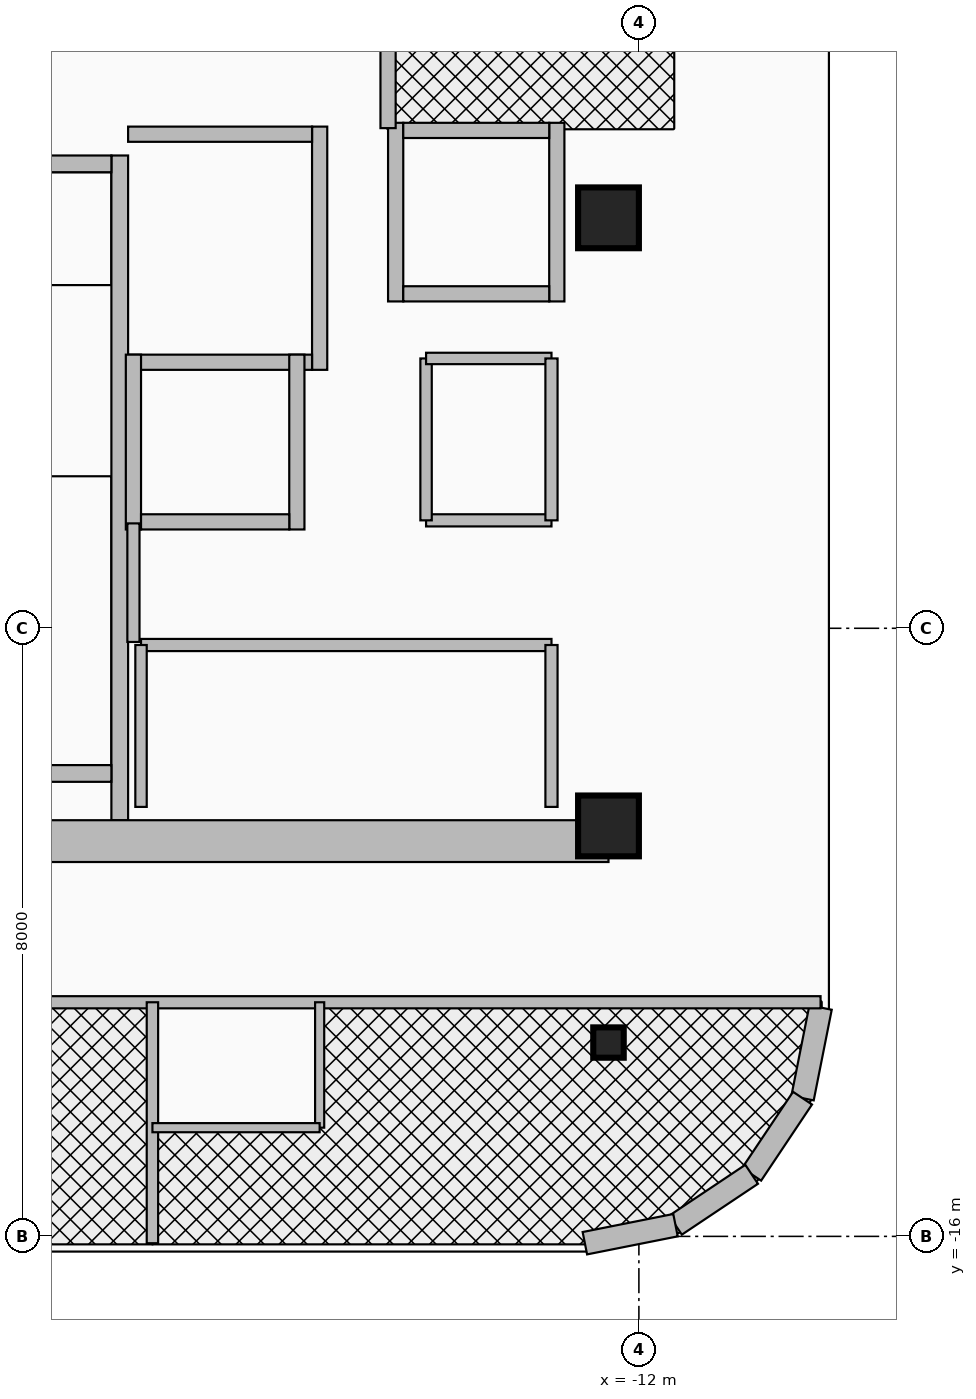
"""IFC4 building model, lengths in metres.
Left out: names, types, materials, properties, quantities, classifications, styles, units other than length and angle.
Written with IfcOpenShell. Run it as: python <this file> out.ifc"""

import sys

from ifc_helpers import new_model, si_unit, direction, frame, frame_2d, origin, origin_2d, place, context, subcontext, project, spatial, rectangle, i_section, extrude, source, transform, mapped, element, fill, save


model = new_model("IFC4")
c1 = context("Model", 3, precision=1e-05, world=origin(), true_north=direction((0.0, 1.0)))
c2 = subcontext(c1, "Body", "Model", "MODEL_VIEW")
j1 = project(units=[si_unit("LENGTHUNIT", "METRE"), si_unit("PLANEANGLEUNIT", "RADIAN")], contexts=[c1])
p1 = place(None, origin())
s1 = spatial("IfcSite", under=j1, at=p1, CompositionType="ELEMENT")
p2 = place(p1, origin())
s2 = spatial("IfcBuilding", under=s1, at=p2, CompositionType="ELEMENT")
p3 = place(p2, frame((0.0, 0.0, 240.5)))
s3 = spatial("IfcBuildingStorey", under=s2, at=p3, CompositionType="ELEMENT", Elevation=240.5)
p4 = place(p3, frame((-18.83, -10.525, 0.0), z_axis=(0.0, 0.0, 1.0), x_axis=(0.0, 1.0, 0.0)))
e1 = element("IfcWall", 1, at=p4, inside=s3, PredefinedType="SHEAR", context=c2, shape_type="SweptSolid", body=[
    extrude(rectangle(XDim=8.745, YDim=0.22, at=frame_2d((4.373, 0.0))), origin(), (0.0, 0.0, 1.0), 3.26),
])
p5 = place(p3, frame((-22.05, -9.91, 0.0), z_axis=(0.0, 0.0, 1.0), x_axis=(1.0, 0.0, 0.0)))
e2 = element("IfcWall", 2, at=p5, inside=s3, PredefinedType="SHEAR", context=c2, shape_type="SweptSolid", body=[
    extrude(rectangle(XDim=3.11, YDim=0.22, at=frame_2d((1.555, 0.0))), origin(), (0.0, 0.0, 1.0), 3.26),
])
p6 = place(p3, frame((-22.05, -1.89, 0.0), z_axis=(0.0, 0.0, 1.0), x_axis=(1.0, 0.0, 0.0)))
e3 = element("IfcWall", 3, at=p6, inside=s3, PredefinedType="SHEAR", context=c2, shape_type="SweptSolid", body=[
    extrude(rectangle(XDim=3.11, YDim=0.22, at=frame_2d((1.555, 0.0))), origin(), (0.0, 0.0, 1.0), 3.26),
])
p7 = place(p6, frame((1.0, 0.0, 0.0)))
e4 = element("IfcOpeningElement", 4, at=p7, cuts=e3, PredefinedType="OPENING", context=c2, shape_type="SweptSolid", body=[
    extrude(rectangle(XDim=1.1, YDim=2.15, at=frame_2d((0.55, 1.075))), frame((0.0, 0.125, 0.0), z_axis=(0.0, -1.0, 0.0), x_axis=(1.0, 0.0, 0.0)), (0.0, 0.0, 1.0), 0.25),
])
p8 = place(p3, frame((-22.65, -10.8, 0.0), z_axis=(0.0, 0.0, 1.0), x_axis=(1.0, 0.0, 0.0)))
e5 = element("IfcWall", 5, at=p8, inside=s3, PredefinedType="SHEAR", context=c2, shape_type="SweptSolid", body=[
    extrude(rectangle(XDim=10.25, YDim=0.55, at=frame_2d((5.125, 0.0))), origin(), (0.0, 0.0, 1.0), 3.26),
])
m1 = source(origin(), c2, "Body", "SweptSolid", [
    extrude(rectangle(XDim=0.8, YDim=0.8, at=origin_2d()), origin(), (0.0, 0.0, 1.0), 3.5),
])
for number, where, z_axis, x_axis in (
    (6, (-12.4, -10.6, 0.0), (0.0, 0.0, 1.0), (1.0, 0.0, 0.0)),
    (7, (-12.4, -2.6, 0.0), (0.0, 0.0, 1.0), (1.0, 0.0, 0.0)),
):
    element("IfcColumn", number, at=place(p3, frame(where, z_axis=z_axis, x_axis=x_axis)), inside=s3, PredefinedType="COLUMN", context=c2, shape_type="MappedRepresentation", body=[
        mapped(m1, transform((0.0, 0.0, 0.0), x_axis=(1.0, 0.0, 0.0), y_axis=(0.0, 1.0, 0.0), z_axis=(0.0, 0.0, 1.0), scale=1.0)),
    ])
m2 = source(origin(), c2, "Body", "SweptSolid", [
    extrude(i_section(OverallWidth=0.401, OverallDepth=0.399, WebThickness=0.025, FlangeThickness=0.04, at=origin_2d()), origin(), (0.0, 0.0, 1.0), 3.5),
])
p9 = place(p3, frame((-12.4, -13.45, 0.0), z_axis=(0.0, 0.0, 1.0), x_axis=(1.0, 0.0, 0.0)))
e8 = element("IfcColumn", 8, at=p9, inside=s3, PredefinedType="COLUMN", context=c2, shape_type="MappedRepresentation", body=[
    mapped(m2, transform((0.0, 0.0, 0.0), x_axis=(1.0, 0.0, 0.0), y_axis=(0.0, 1.0, 0.0), z_axis=(0.0, 0.0, 1.0), scale=1.0)),
])
p10 = place(p3, frame((-9.61, -12.989, 0.0), z_axis=(0.0, 0.0, 1.0), x_axis=(-0.194996050505, -0.980804027463, 0.0)))
e9 = element("IfcWall", 9, at=p10, inside=s3, PredefinedType="SOLIDWALL", context=c2, shape_type="SweptSolid", body=[
    extrude(rectangle(XDim=1.216, YDim=0.3, at=frame_2d((0.608, 0.0))), origin(), (0.0, 0.0, 1.0), 3.26),
])
for number, where, z_axis, x_axis in (
    (10, (-9.847, -14.182, 0.0), (0.0, 0.0, 1.0), (-0.556, -0.831, 0.0)),
    (11, (-10.517, -15.183, 0.0), (0.0, 0.0, 1.0), (-0.831, -0.556, 0.0)),
):
    element("IfcWall", number, at=place(p3, frame(where, z_axis=z_axis, x_axis=x_axis)), inside=s3, PredefinedType="SOLIDWALL", context=c2, shape_type="SweptSolid", body=[
        extrude(rectangle(XDim=1.205, YDim=0.3, at=frame_2d((0.603, 0.0))), origin(), (0.0, 0.0, 1.0), 3.26),
    ])
p11 = place(p3, frame((-11.518, -15.853, 0.0), z_axis=(0.0, 0.0, 1.0), x_axis=(-0.980765602568, -0.195189223115, 0.0)))
e12 = element("IfcWall", 12, at=p11, inside=s3, PredefinedType="SOLIDWALL", context=c2, shape_type="SweptSolid", body=[
    extrude(rectangle(XDim=1.216, YDim=0.3, at=frame_2d((0.608, 0.0))), origin(), (0.0, 0.0, 1.0), 3.26),
])
p12 = place(p3, frame((-16.2, -4.6, 0.0), z_axis=(0.0, 0.0, 1.0), x_axis=(0.0, 1.0, 0.0)))
e13 = element("IfcWall", 13, at=p12, inside=s3, PredefinedType="MOVABLE", context=c2, shape_type="SweptSolid", body=[
    extrude(rectangle(XDim=3.2, YDim=0.2, at=frame_2d((1.6, 0.0))), origin(), (0.0, 0.0, 1.0), 3.26),
])
p13 = place(p3, frame((-18.72, -4.5, 0.0), z_axis=(0.0, 0.0, 1.0), x_axis=(1.0, 0.0, 0.0)))
e14 = element("IfcWall", 14, at=p13, inside=s3, PredefinedType="MOVABLE", context=c2, shape_type="SweptSolid", body=[
    extrude(rectangle(XDim=2.42, YDim=0.2, at=frame_2d((1.21, 0.0))), origin(), (0.0, 0.0, 1.0), 3.26),
])
p14 = place(p3, frame((-18.72, -1.5, 0.0), z_axis=(0.0, 0.0, 1.0), x_axis=(1.0, 0.0, 0.0)))
e15 = element("IfcWall", 15, at=p14, inside=s3, PredefinedType="MOVABLE", context=c2, shape_type="SweptSolid", body=[
    extrude(rectangle(XDim=2.42, YDim=0.2, at=frame_2d((1.21, 0.0))), origin(), (0.0, 0.0, 1.0), 3.26),
])
p15 = place(p14, frame((0.61, 0.0, 0.0)))
e16 = element("IfcOpeningElement", 16, at=p15, cuts=e15, PredefinedType="OPENING", context=c2, shape_type="SweptSolid", body=[
    extrude(rectangle(XDim=1.2, YDim=2.1, at=frame_2d((0.6, 1.05))), frame((0.0, 0.115, 0.0), z_axis=(0.0, -1.0, 0.0), x_axis=(1.0, 0.0, 0.0)), (0.0, 0.0, 1.0), 0.23),
])
for number, where, z_axis, x_axis in (
    (17, (-18.65, -6.7, 0.0), (0.0, 0.0, 1.0), (0.0, 1.0, 0.0)),
    (18, (-16.5, -6.7, 0.0), (0.0, 0.0, 1.0), (0.0, 1.0, 0.0)),
):
    element("IfcWall", number, at=place(p3, frame(where, z_axis=z_axis, x_axis=x_axis)), inside=s3, PredefinedType="MOVABLE", context=c2, shape_type="SweptSolid", body=[
        extrude(rectangle(XDim=2.3, YDim=0.2, at=frame_2d((1.15, 0.0))), origin(), (0.0, 0.0, 1.0), 3.26),
    ])
p16 = place(p3, frame((-18.55, -6.6, 0.0), z_axis=(0.0, 0.0, 1.0), x_axis=(1.0, 0.0, 0.0)))
e19 = element("IfcWall", 19, at=p16, inside=s3, PredefinedType="MOVABLE", context=c2, shape_type="SweptSolid", body=[
    extrude(rectangle(XDim=1.95, YDim=0.2, at=frame_2d((0.975, 0.0))), origin(), (0.0, 0.0, 1.0), 3.26),
])
p17 = place(p16, frame((0.425, 0.0, 0.0)))
e20 = element("IfcOpeningElement", 20, at=p17, cuts=e19, PredefinedType="OPENING", context=c2, shape_type="SweptSolid", body=[
    extrude(rectangle(XDim=1.1, YDim=2.1, at=frame_2d((0.55, 1.05))), frame((0.0, 0.115, 0.0), z_axis=(0.0, -1.0, 0.0), x_axis=(1.0, 0.0, 0.0)), (0.0, 0.0, 1.0), 0.23),
])
for number, where, z_axis, x_axis in (
    (21, (-15.2, -3.7, 0.0), (0.0, 0.0, 1.0), (0.0, 1.0, 0.0)),
    (22, (-13.08, -3.7, 0.0), (0.0, 0.0, 1.0), (0.0, 1.0, 0.0)),
):
    element("IfcWall", number, at=place(p3, frame(where, z_axis=z_axis, x_axis=x_axis)), inside=s3, PredefinedType="MOVABLE", context=c2, shape_type="SweptSolid", body=[
        extrude(rectangle(XDim=2.35, YDim=0.2, at=frame_2d((1.175, 0.0))), origin(), (0.0, 0.0, 1.0), 3.26),
    ])
p18 = place(p3, frame((-15.1, -3.6, 0.0), z_axis=(0.0, 0.0, 1.0), x_axis=(1.0, 0.0, 0.0)))
e23 = element("IfcWall", 23, at=p18, inside=s3, PredefinedType="MOVABLE", context=c2, shape_type="SweptSolid", body=[
    extrude(rectangle(XDim=1.92, YDim=0.2, at=frame_2d((0.96, 0.0))), origin(), (0.0, 0.0, 1.0), 3.26),
])
p19 = place(p3, frame((-15.1, -1.45, 0.0), z_axis=(0.0, 0.0, 1.0), x_axis=(1.0, 0.0, 0.0)))
e24 = element("IfcWall", 24, at=p19, inside=s3, PredefinedType="MOVABLE", context=c2, shape_type="SweptSolid", body=[
    extrude(rectangle(XDim=1.92, YDim=0.2, at=frame_2d((0.96, 0.0))), origin(), (0.0, 0.0, 1.0), 3.26),
])
p20 = place(p19, frame((0.41, 0.0, 0.0)))
e25 = element("IfcOpeningElement", 25, at=p20, cuts=e24, PredefinedType="OPENING", context=c2, shape_type="SweptSolid", body=[
    extrude(rectangle(XDim=1.1, YDim=2.1, at=frame_2d((0.55, 1.05))), frame((0.0, 0.115, 0.0), z_axis=(0.0, -1.0, 0.0), x_axis=(1.0, 0.0, 0.0)), (0.0, 0.0, 1.0), 0.23),
])
p21 = place(p3, frame((-15.3, -1.42, 0.0), z_axis=(0.0, 0.0, 1.0), x_axis=(0.0, 1.0, 0.0)))
e26 = element("IfcWall", 26, at=p21, inside=s3, PredefinedType="PARTITIONING", context=c2, shape_type="SweptSolid", body=[
    extrude(rectangle(XDim=2.67, YDim=0.2, at=frame_2d((1.335, 0.0))), origin(), (0.0, 0.0, 1.0), 3.26),
])
p22 = place(p21, frame((0.78, 0.0, 0.0)))
e27 = element("IfcOpeningElement", 27, at=p22, cuts=e26, PredefinedType="OPENING", context=c2, shape_type="SweptSolid", body=[
    extrude(rectangle(XDim=1.05, YDim=2.15, at=frame_2d((0.525, 1.075))), frame((0.0, 0.115, 0.0), z_axis=(0.0, -1.0, 0.0), x_axis=(1.0, 0.0, 0.0)), (0.0, 0.0, 1.0), 0.23),
])
p23 = place(p3, frame((-18.65, -8.18, 0.0), z_axis=(0.0, 0.0, 1.0), x_axis=(0.0, 1.0, 0.0)))
e28 = element("IfcWall", 28, at=p23, inside=s3, PredefinedType="PARTITIONING", context=c2, shape_type="SweptSolid", body=[
    extrude(rectangle(XDim=1.56, YDim=0.16, at=frame_2d((0.78, 0.0))), origin(), (0.0, 0.0, 1.0), 3.26),
])
p24 = place(p3, frame((-18.55, -8.22, 0.0), z_axis=(0.0, 0.0, 1.0), x_axis=(1.0, 0.0, 0.0)))
e29 = element("IfcWall", 29, at=p24, inside=s3, PredefinedType="PARTITIONING", context=c2, shape_type="SweptSolid", body=[
    extrude(rectangle(XDim=5.4, YDim=0.16, at=frame_2d((2.7, 0.0))), origin(), (0.0, 0.0, 1.0), 3.26),
])
p25 = place(p24, frame((1.15, 0.0, 0.0)))
e30 = element("IfcOpeningElement", 30, at=p25, cuts=e29, PredefinedType="OPENING", context=c2, shape_type="SweptSolid", body=[
    extrude(rectangle(XDim=0.95, YDim=2.15, at=frame_2d((0.475, 1.075))), frame((0.0, 0.095, 0.0), z_axis=(0.0, -1.0, 0.0), x_axis=(1.0, 0.0, 0.0)), (0.0, 0.0, 1.0), 0.19),
])
p26 = place(p3, frame((-18.55, -10.35, 0.0), z_axis=(0.0, 0.0, 1.0), x_axis=(0.0, 1.0, 0.0)))
e31 = element("IfcWall", 31, at=p26, inside=s3, PredefinedType="PARTITIONING", context=c2, shape_type="SweptSolid", body=[
    extrude(rectangle(XDim=2.13, YDim=0.15, at=frame_2d((1.065, 0.0))), origin(), (0.0, 0.0, 1.0), 3.26),
])
p27 = place(p3, frame((-13.15, -10.35, 0.0), z_axis=(0.0, 0.0, 1.0), x_axis=(0.0, 1.0, 0.0)))
e32 = element("IfcWall", 32, at=p27, inside=s3, PredefinedType="PARTITIONING", context=c2, shape_type="SweptSolid", body=[
    extrude(rectangle(XDim=2.13, YDim=0.16, at=frame_2d((1.065, 0.0))), origin(), (0.0, 0.0, 1.0), 3.26),
])
p28 = place(p3, frame((-14.8, -6.58, 0.0), z_axis=(0.0, 0.0, 1.0), x_axis=(1.0, 0.0, 0.0)))
e33 = element("IfcWall", 33, at=p28, inside=s3, PredefinedType="PARTITIONING", context=c2, shape_type="SweptSolid", body=[
    extrude(rectangle(XDim=1.65, YDim=0.16, at=frame_2d((0.825, 0.0))), origin(), (0.0, 0.0, 1.0), 3.26),
])
p29 = place(p28, frame((0.5, 0.0, 0.0)))
e34 = element("IfcOpeningElement", 34, at=p29, cuts=e33, PredefinedType="OPENING", context=c2, shape_type="SweptSolid", body=[
    extrude(rectangle(XDim=0.85, YDim=2.05, at=frame_2d((0.425, 1.025))), frame((0.0, 0.095, 0.0), z_axis=(0.0, -1.0, 0.0), x_axis=(1.0, 0.0, 0.0)), (0.0, 0.0, 1.0), 0.19),
])
p30 = place(p3, frame((-14.8, -6.58, 0.0), z_axis=(0.0, 0.0, 1.0), x_axis=(0.0, 1.0, 0.0)))
e35 = element("IfcWall", 35, at=p30, inside=s3, PredefinedType="PARTITIONING", context=c2, shape_type="SweptSolid", body=[
    extrude(rectangle(XDim=2.13, YDim=0.15, at=frame_2d((1.065, 0.0))), origin(), (0.0, 0.0, 1.0), 3.26),
])
p31 = place(p3, frame((-14.8, -4.45, 0.0), z_axis=(0.0, 0.0, 1.0), x_axis=(1.0, 0.0, 0.0)))
e36 = element("IfcWall", 36, at=p31, inside=s3, PredefinedType="PARTITIONING", context=c2, shape_type="SweptSolid", body=[
    extrude(rectangle(XDim=1.65, YDim=0.15, at=frame_2d((0.825, 0.0))), origin(), (0.0, 0.0, 1.0), 3.26),
])
p32 = place(p3, frame((-13.15, -6.58, 0.0), z_axis=(0.0, 0.0, 1.0), x_axis=(0.0, 1.0, 0.0)))
e37 = element("IfcWall", 37, at=p32, inside=s3, PredefinedType="PARTITIONING", context=c2, shape_type="SweptSolid", body=[
    extrude(rectangle(XDim=2.13, YDim=0.16, at=frame_2d((1.065, 0.0))), origin(), (0.0, 0.0, 1.0), 3.26),
])
p33 = place(p3, frame((-30.39, -12.92, 0.0), z_axis=(0.0, 0.0, 1.0), x_axis=(1.0, 0.0, 0.0)))
e38 = element("IfcWall", 38, at=p33, inside=s3, PredefinedType="PARTITIONING", context=c2, shape_type="SweptSolid", body=[
    extrude(rectangle(XDim=20.78, YDim=0.16, at=frame_2d((10.39, 0.0))), origin(), (0.0, 0.0, 1.0), 2.634),
])
p34 = place(p33, frame((6.5, 0.0, 0.0)))
e39 = element("IfcOpeningElement", 39, at=p34, cuts=e38, PredefinedType="OPENING", context=c2, shape_type="SweptSolid", body=[
    extrude(rectangle(XDim=0.95, YDim=2.15, at=frame_2d((0.475, 1.075))), frame((0.0, 0.095, 0.0), z_axis=(0.0, -1.0, 0.0), x_axis=(1.0, 0.0, 0.0)), (0.0, 0.0, 1.0), 0.19),
])
p35 = place(p33, frame((16.73, 0.0, 0.0)))
e40 = element("IfcOpeningElement", 40, at=p35, cuts=e38, PredefinedType="OPENING", context=c2, shape_type="SweptSolid", body=[
    extrude(rectangle(XDim=0.95, YDim=2.15, at=frame_2d((0.475, 1.075))), frame((0.0, 0.095, 0.0), z_axis=(0.0, -1.0, 0.0), x_axis=(1.0, 0.0, 0.0)), (0.0, 0.0, 1.0), 0.19),
])
p36 = place(p3, frame((-18.4, -16.09, 0.0), z_axis=(0.0, 0.0, 1.0), x_axis=(0.0, 1.0, 0.0)))
e41 = element("IfcWall", 41, at=p36, inside=s3, PredefinedType="PARTITIONING", context=c2, shape_type="SweptSolid", body=[
    extrude(rectangle(XDim=3.17, YDim=0.15, at=frame_2d((1.585, 0.0))), origin(), (0.0, 0.0, 1.0), 2.706),
])
p37 = place(p3, frame((-16.2, -14.57, 0.0), z_axis=(0.0, 0.0, 1.0), x_axis=(0.0, 1.0, 0.0)))
e42 = element("IfcWall", 42, at=p37, inside=s3, PredefinedType="PARTITIONING", context=c2, shape_type="SweptSolid", body=[
    extrude(rectangle(XDim=1.65, YDim=0.12, at=frame_2d((0.825, 0.0))), origin(), (0.0, 0.0, 1.0), 2.706),
])
p38 = place(p3, frame((-18.4, -14.57, 0.0), z_axis=(0.0, 0.0, 1.0), x_axis=(1.0, 0.0, 0.0)))
e43 = element("IfcWall", 43, at=p38, inside=s3, PredefinedType="PARTITIONING", context=c2, shape_type="SweptSolid", body=[
    extrude(rectangle(XDim=2.2, YDim=0.12, at=frame_2d((1.1, 0.0))), origin(), (0.0, 0.0, 1.0), 3.26),
])
p39 = place(p38, frame((0.675, 0.0, 0.0)))
e44 = element("IfcOpeningElement", 44, at=p39, cuts=e43, PredefinedType="OPENING", context=c2, shape_type="SweptSolid", body=[
    extrude(rectangle(XDim=0.85, YDim=2.1, at=frame_2d((0.425, 1.05))), frame((0.0, 0.075, 0.0), z_axis=(0.0, -1.0, 0.0), x_axis=(1.0, 0.0, 0.0)), (0.0, 0.0, 1.0), 0.15),
])
p40 = place(p15, origin())
e45 = element("IfcDoor", 45, at=p40, inside=s3, OperationType="DOUBLE_DOOR_SLIDING", PredefinedType="DOOR", context=c2, shape_type="SweptSolid", body=[
    extrude(rectangle(XDim=1.2, YDim=2.1, at=frame_2d((0.6, 1.05))), frame((0.0, 0.025, 0.0), z_axis=(0.0, -1.0, 0.0), x_axis=(1.0, 0.0, 0.0)), (0.0, 0.0, 1.0), 0.05),
])
fill(e16, e45)
p41 = place(p17, origin())
e46 = element("IfcDoor", 46, at=p41, inside=s3, OperationType="DOUBLE_DOOR_SLIDING", PredefinedType="DOOR", context=c2, shape_type="SweptSolid", body=[
    extrude(rectangle(XDim=1.1, YDim=2.1, at=frame_2d((0.55, 1.05))), frame((0.0, 0.025, 0.0), z_axis=(0.0, -1.0, 0.0), x_axis=(1.0, 0.0, 0.0)), (0.0, 0.0, 1.0), 0.05),
])
fill(e20, e46)
p42 = place(p20, origin())
e47 = element("IfcDoor", 47, at=p42, inside=s3, OperationType="DOUBLE_DOOR_SLIDING", PredefinedType="DOOR", context=c2, shape_type="SweptSolid", body=[
    extrude(rectangle(XDim=1.1, YDim=2.1, at=frame_2d((0.55, 1.05))), frame((0.0, 0.025, 0.0), z_axis=(0.0, -1.0, 0.0), x_axis=(1.0, 0.0, 0.0)), (0.0, 0.0, 1.0), 0.05),
])
fill(e25, e47)
p43 = place(p22, origin())
e48 = element("IfcDoor", 48, at=p43, inside=s3, OperationType="SINGLE_SWING_RIGHT", PredefinedType="DOOR", context=c2, shape_type="SweptSolid", body=[
    extrude(rectangle(XDim=1.05, YDim=2.15, at=frame_2d((0.525, 1.075))), frame((0.0, 0.025, 0.0), z_axis=(0.0, -1.0, 0.0), x_axis=(1.0, 0.0, 0.0)), (0.0, 0.0, 1.0), 0.05),
])
fill(e27, e48)
p44 = place(p25, origin())
e49 = element("IfcDoor", 49, at=p44, inside=s3, OperationType="SINGLE_SWING_RIGHT", PredefinedType="DOOR", context=c2, shape_type="SweptSolid", body=[
    extrude(rectangle(XDim=0.95, YDim=2.15, at=frame_2d((0.475, 1.075))), frame((0.0, 0.025, 0.0), z_axis=(0.0, -1.0, 0.0), x_axis=(1.0, 0.0, 0.0)), (0.0, 0.0, 1.0), 0.05),
])
fill(e30, e49)
p45 = place(p29, origin())
e50 = element("IfcDoor", 50, at=p45, inside=s3, OperationType="SINGLE_SWING_LEFT", PredefinedType="DOOR", context=c2, shape_type="SweptSolid", body=[
    extrude(rectangle(XDim=0.85, YDim=2.05, at=frame_2d((0.425, 1.025))), frame((0.0, 0.025, 0.0), z_axis=(0.0, -1.0, 0.0), x_axis=(1.0, 0.0, 0.0)), (0.0, 0.0, 1.0), 0.05),
])
fill(e34, e50)
p46 = place(p35, frame((0.95, 0.0, 0.0), z_axis=(0.0, 0.0, 1.0), x_axis=(-1.0, 0.0, 0.0)))
e51 = element("IfcDoor", 51, at=p46, inside=s3, OperationType="SINGLE_SWING_LEFT", PredefinedType="DOOR", context=c2, shape_type="SweptSolid", body=[
    extrude(rectangle(XDim=0.95, YDim=2.15, at=frame_2d((0.475, 1.075))), frame((0.0, 0.025, 0.0), z_axis=(0.0, -1.0, 0.0), x_axis=(1.0, 0.0, 0.0)), (0.0, 0.0, 1.0), 0.05),
])
fill(e40, e51)
p47 = place(p39, origin())
e52 = element("IfcDoor", 52, at=p47, inside=s3, OperationType="SINGLE_SWING_RIGHT", PredefinedType="DOOR", context=c2, shape_type="SweptSolid", body=[
    extrude(rectangle(XDim=0.85, YDim=2.1, at=frame_2d((0.425, 1.05))), frame((0.0, 0.025, 0.0), z_axis=(0.0, -1.0, 0.0), x_axis=(1.0, 0.0, 0.0)), (0.0, 0.0, 1.0), 0.05),
])
fill(e44, e52)
save(model, sys.argv[1])
